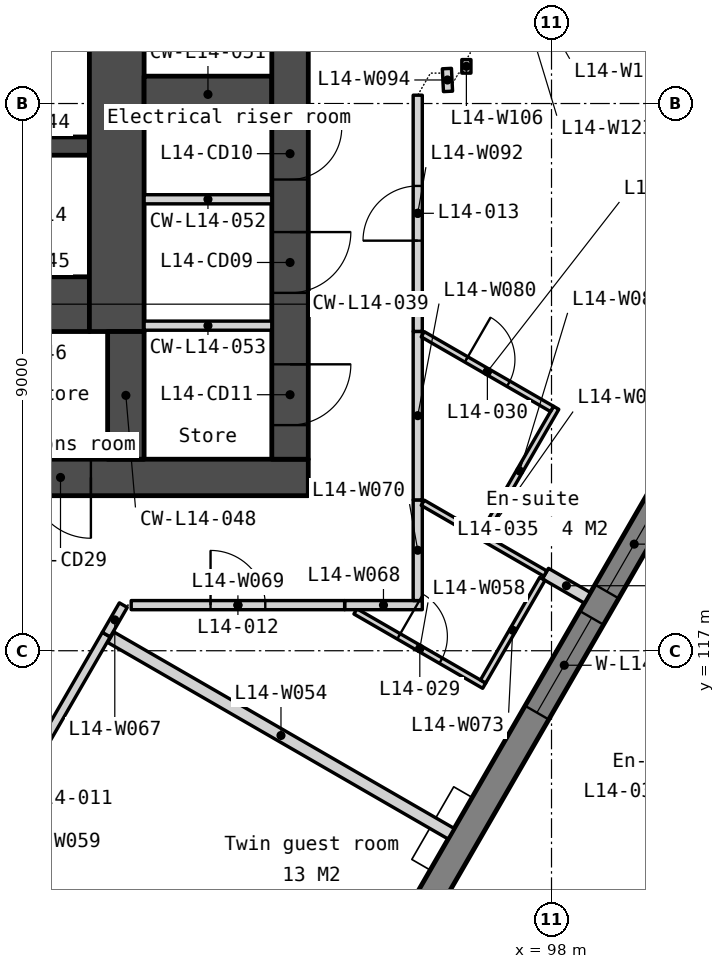
"""IFC4 building model, lengths in metres.
Left out: names, types, materials, properties, quantities, classifications, styles, units other than length and angle.
Written with IfcOpenShell. Run it as: python <this file> out.ifc"""

import sys

from ifc_helpers import new_model, si_unit, direction, frame, frame_2d, origin, place, context, subcontext, project, spatial, polyline, rectangle, outline, extrude, element, fill, save


model = new_model("IFC4")
c1 = context("Model", 3, precision=1e-05, world=origin(), true_north=direction((0.0, 1.0)))
c2 = subcontext(c1, "Body", "Model", "MODEL_VIEW")
j1 = project(units=[si_unit("LENGTHUNIT", "METRE"), si_unit("PLANEANGLEUNIT", "RADIAN")], contexts=[c1])
p1 = place(None, origin())
s1 = spatial("IfcSite", under=j1, at=p1, CompositionType="ELEMENT")
p2 = place(p1, origin())
s2 = spatial("IfcBuilding", under=s1, at=p2, CompositionType="ELEMENT")
p3 = place(p2, frame((0.0, 0.0, 63.0)))
s3 = spatial("IfcBuildingStorey", under=s2, at=p3, CompositionType="ELEMENT", Elevation=63.0)
p4 = place(p3, frame((66.0, 119.85, 0.0), z_axis=(0.0, 0.0, 1.0), x_axis=(1.0, 0.0, 0.0)))
e1 = element("IfcWall", 1, at=p4, inside=s3, PredefinedType="SOLIDWALL", context=c2, shape_type="SweptSolid", body=[
    extrude(rectangle(XDim=28.0, YDim=0.6, at=frame_2d((14.0, 0.0))), origin(), (0.0, 0.0, 1.0), 3.35),
])
p5 = place(p4, frame((6.825, 0.0, 0.0)))
e2 = element("IfcOpeningElement", 2, at=p5, cuts=e1, PredefinedType="OPENING", context=c2, shape_type="SweptSolid", body=[
    extrude(rectangle(XDim=1.8, YDim=2.1, at=frame_2d((0.9, 1.05))), frame((0.0, 0.31, 0.0), z_axis=(0.0, -1.0, 0.0), x_axis=(1.0, 0.0, 0.0)), (0.0, 0.0, 1.0), 0.62),
])
p6 = place(p4, frame((15.85, 0.0, 0.0)))
e3 = element("IfcOpeningElement", 3, at=p6, cuts=e1, PredefinedType="OPENING", context=c2, shape_type="SweptSolid", body=[
    extrude(rectangle(XDim=1.5, YDim=2.1, at=frame_2d((0.75, 1.05))), frame((0.0, 0.31, 0.0), z_axis=(0.0, -1.0, 0.0), x_axis=(1.0, 0.0, 0.0)), (0.0, 0.0, 1.0), 0.62),
])
p7 = place(p4, frame((19.375, 0.0, 0.0)))
e4 = element("IfcOpeningElement", 4, at=p7, cuts=e1, PredefinedType="OPENING", context=c2, shape_type="SweptSolid", body=[
    extrude(rectangle(XDim=1.8, YDim=2.1, at=frame_2d((0.9, 1.05))), frame((0.0, 0.31, 0.0), z_axis=(0.0, -1.0, 0.0), x_axis=(1.0, 0.0, 0.0)), (0.0, 0.0, 1.0), 0.62),
])
p8 = place(p4, frame((4.425, 0.0, 0.0)))
e5 = element("IfcOpeningElement", 5, at=p8, cuts=e1, PredefinedType="OPENING", context=c2, shape_type="SweptSolid", body=[
    extrude(rectangle(XDim=1.0, YDim=2.1, at=frame_2d((0.5, 1.05))), frame((0.0, 0.31, 0.0), z_axis=(0.0, -1.0, 0.0), x_axis=(1.0, 0.0, 0.0)), (0.0, 0.0, 1.0), 0.62),
])
p9 = place(p4, frame((9.925, 0.0, 0.0)))
e6 = element("IfcOpeningElement", 6, at=p9, cuts=e1, PredefinedType="OPENING", context=c2, shape_type="SweptSolid", body=[
    extrude(rectangle(XDim=1.0, YDim=2.1, at=frame_2d((0.5, 1.05))), frame((0.0, 0.31, 0.0), z_axis=(0.0, -1.0, 0.0), x_axis=(1.0, 0.0, 0.0)), (0.0, 0.0, 1.0), 0.62),
])
p10 = place(p4, frame((13.125, 0.0, 0.0)))
e7 = element("IfcOpeningElement", 7, at=p10, cuts=e1, PredefinedType="OPENING", context=c2, shape_type="SweptSolid", body=[
    extrude(rectangle(XDim=1.0, YDim=2.1, at=frame_2d((0.5, 1.05))), frame((0.0, 0.31, 0.0), z_axis=(0.0, -1.0, 0.0), x_axis=(1.0, 0.0, 0.0)), (0.0, 0.0, 1.0), 0.62),
])
p11 = place(p4, frame((21.725, 0.0, 0.0)))
e8 = element("IfcOpeningElement", 8, at=p11, cuts=e1, PredefinedType="OPENING", context=c2, shape_type="SweptSolid", body=[
    extrude(rectangle(XDim=1.0, YDim=2.1, at=frame_2d((0.5, 1.05))), frame((0.0, 0.31, 0.0), z_axis=(0.0, -1.0, 0.0), x_axis=(1.0, 0.0, 0.0)), (0.0, 0.0, 1.0), 0.62),
])
p12 = place(p4, frame((23.425, 0.0, 0.0)))
e9 = element("IfcOpeningElement", 9, at=p12, cuts=e1, PredefinedType="OPENING", context=c2, shape_type="SweptSolid", body=[
    extrude(rectangle(XDim=1.0, YDim=2.1, at=frame_2d((0.5, 1.05))), frame((0.0, 0.31, 0.0), z_axis=(0.0, -1.0, 0.0), x_axis=(1.0, 0.0, 0.0)), (0.0, 0.0, 1.0), 0.62),
])
p13 = place(p3, frame((87.85, 125.3, 0.0), z_axis=(0.0, 0.0, 1.0), x_axis=(1.0, 0.0, 0.0)))
e10 = element("IfcWall", 10, at=p13, inside=s3, PredefinedType="SOLIDWALL", context=c2, shape_type="SweptSolid", body=[
    extrude(rectangle(XDim=2.55, YDim=0.3, at=frame_2d((1.275, 0.0))), origin(), (0.0, 0.0, 1.0), 3.35),
])
p14 = place(p3, frame((87.85, 122.7, 0.0), z_axis=(0.0, 0.0, 1.0), x_axis=(1.0, 0.0, 0.0)))
e11 = element("IfcWall", 11, at=p14, inside=s3, PredefinedType="SOLIDWALL", context=c2, shape_type="SweptSolid", body=[
    extrude(rectangle(XDim=2.55, YDim=0.9, at=frame_2d((1.275, 0.0))), origin(), (0.0, 0.0, 1.0), 3.35),
])
p15 = place(p3, frame((90.85, 133.95, 0.0), z_axis=(0.0, 0.0, 1.0), x_axis=(0.0, -1.0, 0.0)))
e12 = element("IfcWall", 12, at=p15, inside=s3, PredefinedType="SOLIDWALL", context=c2, shape_type="SweptSolid", body=[
    extrude(rectangle(XDim=11.7, YDim=0.9, at=frame_2d((5.85, 0.0))), origin(), (0.0, 0.0, 1.0), 3.35),
])
p16 = place(p3, frame((91.0, 122.25, 0.0), z_axis=(0.0, 0.0, 1.0), x_axis=(0.0, -1.0, 0.0)))
e13 = element("IfcWall", 13, at=p16, inside=s3, PredefinedType="SOLIDWALL", context=c2, shape_type="SweptSolid", body=[
    extrude(rectangle(XDim=2.1, YDim=0.6, at=frame_2d((1.05, 0.0))), origin(), (0.0, 0.0, 1.0), 3.35),
])
p17 = place(p3, frame((91.3, 126.15, 0.0), z_axis=(0.0, 0.0, 1.0), x_axis=(1.0, 0.0, 0.0)))
e14 = element("IfcWall", 14, at=p17, inside=s3, PredefinedType="SOLIDWALL", context=c2, shape_type="SweptSolid", body=[
    extrude(rectangle(XDim=2.1, YDim=0.6, at=frame_2d((1.05, 0.0))), origin(), (0.0, 0.0, 1.0), 3.35),
])
for number, where, z_axis, x_axis in (
    (15, (91.3, 124.425, 0.0), (0.0, 0.0, 1.0), (1.0, 0.0, 0.0)),
    (16, (91.3, 122.346, 0.0), (0.0, 0.0, 1.0), (1.0, 0.0, 0.0)),
):
    element("IfcWall", number, at=place(p3, frame(where, z_axis=z_axis, x_axis=x_axis)), inside=s3, PredefinedType="PARTITIONING", context=c2, shape_type="SweptSolid", body=[
        extrude(rectangle(XDim=2.1, YDim=0.15, at=frame_2d((1.05, 0.0))), origin(), (0.0, 0.0, 1.0), 3.35),
    ])
p18 = place(p3, frame((93.7, 133.95, 0.0), z_axis=(0.0, 0.0, 1.0), x_axis=(0.0, -1.0, 0.0)))
e17 = element("IfcWall", 17, at=p18, inside=s3, PredefinedType="SOLIDWALL", context=c2, shape_type="SweptSolid", body=[
    extrude(rectangle(XDim=13.8, YDim=0.6, at=frame_2d((6.9, 0.0))), origin(), (0.0, 0.0, 1.0), 3.35),
])
p19 = place(p18, frame((0.6, 0.0, 0.0)))
e18 = element("IfcOpeningElement", 18, at=p19, cuts=e17, PredefinedType="OPENING", context=c2, shape_type="SweptSolid", body=[
    extrude(rectangle(XDim=1.1, YDim=2.1, at=frame_2d((0.55, 1.05))), frame((0.0, 0.31, 0.0), z_axis=(0.0, -1.0, 0.0), x_axis=(1.0, 0.0, 0.0)), (0.0, 0.0, 1.0), 0.62),
])
p20 = place(p18, frame((10.064, 0.0, 0.0)))
e19 = element("IfcOpeningElement", 19, at=p20, cuts=e17, PredefinedType="OPENING", context=c2, shape_type="SweptSolid", body=[
    extrude(rectangle(XDim=1.0, YDim=2.1, at=frame_2d((0.5, 1.05))), frame((0.0, 0.31, 0.0), z_axis=(0.0, -1.0, 0.0), x_axis=(1.0, 0.0, 0.0)), (0.0, 0.0, 1.0), 0.62),
])
p21 = place(p18, frame((8.35, 0.0, 0.0)))
e20 = element("IfcOpeningElement", 20, at=p21, cuts=e17, PredefinedType="OPENING", context=c2, shape_type="SweptSolid", body=[
    extrude(rectangle(XDim=0.85, YDim=2.1, at=frame_2d((0.425, 1.05))), frame((0.0, 0.31, 0.0), z_axis=(0.0, -1.0, 0.0), x_axis=(1.0, 0.0, 0.0)), (0.0, 0.0, 1.0), 0.62),
])
p22 = place(p18, frame((12.239, 0.0, 0.0)))
e21 = element("IfcOpeningElement", 21, at=p22, cuts=e17, PredefinedType="OPENING", context=c2, shape_type="SweptSolid", body=[
    extrude(rectangle(XDim=1.0, YDim=2.1, at=frame_2d((0.5, 1.05))), frame((0.0, 0.31, 0.0), z_axis=(0.0, -1.0, 0.0), x_axis=(1.0, 0.0, 0.0)), (0.0, 0.0, 1.0), 0.62),
])
p23 = place(p3, frame((83.105, 90.599, -0.15), z_axis=(0.0, 0.0, 1.0), x_axis=(0.499999201451, 0.866025864826, 0.0)))
e22 = element("IfcWall", 22, at=p23, inside=s3, PredefinedType="SOLIDWALL", context=c2, shape_type="SweptSolid", body=[
    extrude(outline(polyline([(44.8, 0.0), (44.8, 3.5), (0.0, 3.5), (0.0, 0.0), (44.8, 0.0)])), frame((0.0, 0.225, 0.0), z_axis=(0.0, -1.0, 0.0), x_axis=(1.0, 0.0, 0.0)), (0.0, 0.0, 1.0), 0.45),
])
p24 = place(p23, frame((2.43, 0.0, 1.05)))
e23 = element("IfcOpeningElement", 23, at=p24, cuts=e22, PredefinedType="OPENING", context=c2, shape_type="SweptSolid", body=[
    extrude(rectangle(XDim=1.8, YDim=1.5, at=frame_2d((0.9, 0.75))), frame((0.0, 0.235, 0.0), z_axis=(0.0, -1.0, 0.0), x_axis=(1.0, 0.0, 0.0)), (0.0, 0.0, 1.0), 0.47),
])
p25 = place(p23, frame((4.73, 0.0, 1.05)))
e24 = element("IfcOpeningElement", 24, at=p25, cuts=e22, PredefinedType="OPENING", context=c2, shape_type="SweptSolid", body=[
    extrude(rectangle(XDim=1.8, YDim=1.5, at=frame_2d((0.9, 0.75))), frame((0.0, 0.235, 0.0), z_axis=(0.0, -1.0, 0.0), x_axis=(1.0, 0.0, 0.0)), (0.0, 0.0, 1.0), 0.47),
])
p26 = place(p23, frame((11.39, 0.0, 1.05)))
e25 = element("IfcOpeningElement", 25, at=p26, cuts=e22, PredefinedType="OPENING", context=c2, shape_type="SweptSolid", body=[
    extrude(rectangle(XDim=1.8, YDim=1.5, at=frame_2d((0.9, 0.75))), frame((0.0, 0.235, 0.0), z_axis=(0.0, -1.0, 0.0), x_axis=(1.0, 0.0, 0.0)), (0.0, 0.0, 1.0), 0.47),
])
p27 = place(p23, frame((13.69, 0.0, 1.05)))
e26 = element("IfcOpeningElement", 26, at=p27, cuts=e22, PredefinedType="OPENING", context=c2, shape_type="SweptSolid", body=[
    extrude(rectangle(XDim=1.8, YDim=1.5, at=frame_2d((0.9, 0.75))), frame((0.0, 0.235, 0.0), z_axis=(0.0, -1.0, 0.0), x_axis=(1.0, 0.0, 0.0)), (0.0, 0.0, 1.0), 0.47),
])
p28 = place(p23, frame((20.35, 0.0, 1.05)))
e27 = element("IfcOpeningElement", 27, at=p28, cuts=e22, PredefinedType="OPENING", context=c2, shape_type="SweptSolid", body=[
    extrude(rectangle(XDim=1.8, YDim=1.5, at=frame_2d((0.9, 0.75))), frame((0.0, 0.235, 0.0), z_axis=(0.0, -1.0, 0.0), x_axis=(1.0, 0.0, 0.0)), (0.0, 0.0, 1.0), 0.47),
])
p29 = place(p23, frame((22.65, 0.0, 1.05)))
e28 = element("IfcOpeningElement", 28, at=p29, cuts=e22, PredefinedType="OPENING", context=c2, shape_type="SweptSolid", body=[
    extrude(rectangle(XDim=1.8, YDim=1.5, at=frame_2d((0.9, 0.75))), frame((0.0, 0.235, 0.0), z_axis=(0.0, -1.0, 0.0), x_axis=(1.0, 0.0, 0.0)), (0.0, 0.0, 1.0), 0.47),
])
p30 = place(p23, frame((29.31, 0.0, 1.05)))
e29 = element("IfcOpeningElement", 29, at=p30, cuts=e22, PredefinedType="OPENING", context=c2, shape_type="SweptSolid", body=[
    extrude(rectangle(XDim=1.8, YDim=1.5, at=frame_2d((0.9, 0.75))), frame((0.0, 0.235, 0.0), z_axis=(0.0, -1.0, 0.0), x_axis=(1.0, 0.0, 0.0)), (0.0, 0.0, 1.0), 0.47),
])
p31 = place(p23, frame((31.61, 0.0, 1.05)))
e30 = element("IfcOpeningElement", 30, at=p31, cuts=e22, PredefinedType="OPENING", context=c2, shape_type="SweptSolid", body=[
    extrude(rectangle(XDim=1.8, YDim=1.5, at=frame_2d((0.9, 0.75))), frame((0.0, 0.235, 0.0), z_axis=(0.0, -1.0, 0.0), x_axis=(1.0, 0.0, 0.0)), (0.0, 0.0, 1.0), 0.47),
])
p32 = place(p23, frame((38.27, 0.0, 1.05)))
e31 = element("IfcOpeningElement", 31, at=p32, cuts=e22, PredefinedType="OPENING", context=c2, shape_type="SweptSolid", body=[
    extrude(rectangle(XDim=1.8, YDim=1.5, at=frame_2d((0.9, 0.75))), frame((0.0, 0.235, 0.0), z_axis=(0.0, -1.0, 0.0), x_axis=(1.0, 0.0, 0.0)), (0.0, 0.0, 1.0), 0.47),
])
p33 = place(p23, frame((40.57, 0.0, 1.05)))
e32 = element("IfcOpeningElement", 32, at=p33, cuts=e22, PredefinedType="OPENING", context=c2, shape_type="SweptSolid", body=[
    extrude(rectangle(XDim=1.8, YDim=1.5, at=frame_2d((0.9, 0.75))), frame((0.0, 0.235, 0.0), z_axis=(0.0, -1.0, 0.0), x_axis=(1.0, 0.0, 0.0)), (0.0, 0.0, 1.0), 0.47),
])
p34 = place(p3, frame((90.751, 117.223, 0.0), z_axis=(0.0, 0.0, 1.0), x_axis=(0.866015162859, -0.500017737384, 0.0)))
e33 = element("IfcWall", 33, at=p34, inside=s3, PredefinedType="PARTITIONING", context=c2, shape_type="SweptSolid", body=[
    extrude(rectangle(XDim=6.465, YDim=0.2, at=frame_2d((3.232, 0.0))), origin(), (0.0, 0.0, 1.0), 3.35),
])
p35 = place(p3, frame((94.775, 117.647, 0.0), z_axis=(0.0, 0.0, 1.0), x_axis=(0.86604092097, -0.499973122483, 0.0)))
e34 = element("IfcWall", 34, at=p35, inside=s3, PredefinedType="PARTITIONING", context=c2, shape_type="SweptSolid", body=[
    extrude(rectangle(XDim=2.445, YDim=0.1, at=frame_2d((1.223, 0.0))), origin(), (0.0, 0.0, 1.0), 3.35),
])
p36 = place(p35, frame((0.823, 0.0, 0.0)))
e35 = element("IfcOpeningElement", 35, at=p36, cuts=e34, PredefinedType="OPENING", context=c2, shape_type="SweptSolid", body=[
    extrude(rectangle(XDim=0.8, YDim=2.1, at=frame_2d((0.4, 1.05))), frame((0.0, 0.06, 0.0), z_axis=(0.0, -1.0, 0.0), x_axis=(1.0, 0.0, 0.0)), (0.0, 0.0, 1.0), 0.12),
])
p37 = place(p3, frame((87.548, 111.844, 0.0), z_axis=(0.0, 0.0, 1.0), x_axis=(0.499981277565, 0.866036212918, 0.0)))
e36 = element("IfcWall", 36, at=p37, inside=s3, PredefinedType="PARTITIONING", context=c2, shape_type="SweptSolid", body=[
    extrude(rectangle(XDim=6.26, YDim=0.15, at=frame_2d((3.13, 0.0))), origin(), (0.0, 0.0, 1.0), 3.35),
])
p38 = place(p37, frame((2.63, 0.0, 0.0)))
e37 = element("IfcOpeningElement", 37, at=p38, cuts=e36, PredefinedType="OPENING", context=c2, shape_type="SweptSolid", body=[
    extrude(rectangle(XDim=1.0, YDim=2.1, at=frame_2d((0.5, 1.05))), frame((0.0, 0.085, 0.0), z_axis=(0.0, -1.0, 0.0), x_axis=(1.0, 0.0, 0.0)), (0.0, 0.0, 1.0), 0.17),
])
p39 = place(p3, frame((90.678, 117.265, 0.0), z_axis=(0.0, 0.0, 1.0), x_axis=(0.50012503653, 0.865953201874, 0.0)))
e38 = element("IfcWall", 38, at=p39, inside=s3, PredefinedType="PARTITIONING", context=c2, shape_type="SweptSolid", body=[
    extrude(rectangle(XDim=0.56, YDim=0.15, at=frame_2d((0.28, 0.0))), origin(), (0.0, 0.0, 1.0), 3.35),
])
p40 = place(p3, frame((94.598, 117.75, 0.0), z_axis=(0.0, 0.0, 1.0), x_axis=(1.0, 0.0, 0.0)))
e39 = element("IfcWall", 39, at=p40, inside=s3, PredefinedType="PARTITIONING", context=c2, shape_type="SweptSolid", body=[
    extrude(rectangle(XDim=1.277, YDim=0.15, at=frame_2d((0.639, 0.0))), origin(), (0.0, 0.0, 1.0), 3.35),
])
p41 = place(p3, frame((91.088, 117.75, 0.0), z_axis=(0.0, 0.0, 1.0), x_axis=(1.0, 0.0, 0.0)))
e40 = element("IfcWall", 40, at=p41, inside=s3, PredefinedType="PARTITIONING", context=c2, shape_type="SweptSolid", body=[
    extrude(rectangle(XDim=3.51, YDim=0.15, at=frame_2d((1.755, 0.0))), origin(), (0.0, 0.0, 1.0), 3.35),
])
p42 = place(p41, frame((1.305, 0.0, 0.0)))
e41 = element("IfcOpeningElement", 41, at=p42, cuts=e40, PredefinedType="OPENING", context=c2, shape_type="SweptSolid", body=[
    extrude(rectangle(XDim=0.9, YDim=2.1, at=frame_2d((0.45, 1.05))), frame((0.0, 0.085, 0.0), z_axis=(0.0, -1.0, 0.0), x_axis=(1.0, 0.0, 0.0)), (0.0, 0.0, 1.0), 0.17),
])
p43 = place(p3, frame((95.8, 117.825, 0.0), z_axis=(0.0, 0.0, 1.0), x_axis=(0.0, 1.0, 0.0)))
e42 = element("IfcWall", 42, at=p43, inside=s3, PredefinedType="PARTITIONING", context=c2, shape_type="SweptSolid", body=[
    extrude(rectangle(XDim=1.656, YDim=0.15, at=frame_2d((0.828, 0.0))), origin(), (0.0, 0.0, 1.0), 3.35),
])
p44 = place(p3, frame((97.9, 118.269, 0.0), z_axis=(0.0, 0.0, 1.0), x_axis=(0.866068339032, -0.499925626596, 0.0)))
e43 = element("IfcWall", 43, at=p44, inside=s3, PredefinedType="PARTITIONING", context=c2, shape_type="SweptSolid", body=[
    extrude(rectangle(XDim=0.797, YDim=0.2, at=frame_2d((0.399, 0.0))), origin(), (0.0, 0.0, 1.0), 3.35),
])
p45 = place(p3, frame((96.875, 116.493, 0.0), z_axis=(0.0, 0.0, 1.0), x_axis=(0.500043961785, 0.866000020948, 0.0)))
e44 = element("IfcWall", 44, at=p45, inside=s3, PredefinedType="PARTITIONING", context=c2, shape_type="SweptSolid", body=[
    extrude(rectangle(XDim=1.95, YDim=0.1, at=frame_2d((0.975, 0.0))), origin(), (0.0, 0.0, 1.0), 3.35),
])
p46 = place(p3, frame((95.882, 119.433, 0.0), z_axis=(0.0, 0.0, 1.0), x_axis=(0.866009305107, -0.50002788269, 0.0)))
e45 = element("IfcWall", 45, at=p46, inside=s3, PredefinedType="PARTITIONING", context=c2, shape_type="SweptSolid", body=[
    extrude(rectangle(XDim=2.329, YDim=0.1, at=frame_2d((1.165, 0.0))), origin(), (0.0, 0.0, 1.0), 3.35),
])
p47 = place(p3, frame((95.8, 119.481, 0.0), z_axis=(0.0, 0.0, 1.0), x_axis=(0.0, 1.0, 0.0)))
e46 = element("IfcWall", 46, at=p47, inside=s3, PredefinedType="PARTITIONING", context=c2, shape_type="SweptSolid", body=[
    extrude(rectangle(XDim=2.771, YDim=0.15, at=frame_2d((1.386, 0.0))), origin(), (0.0, 0.0, 1.0), 3.35),
])
p48 = place(p3, frame((96.877, 118.917, 0.0), z_axis=(0.0, 0.0, 1.0), x_axis=(0.500001309137, 0.866024647952, 0.0)))
e47 = element("IfcWall", 47, at=p48, inside=s3, PredefinedType="PARTITIONING", context=c2, shape_type="SweptSolid", body=[
    extrude(rectangle(XDim=2.4, YDim=0.1, at=frame_2d((1.2, 0.0))), origin(), (0.0, 0.0, 1.0), 3.35),
])
p49 = place(p3, frame((95.882, 122.205, 0.0), z_axis=(0.0, 0.0, 1.0), x_axis=(0.866006720078, -0.500032359733, 0.0)))
e48 = element("IfcWall", 48, at=p49, inside=s3, PredefinedType="PARTITIONING", context=c2, shape_type="SweptSolid", body=[
    extrude(rectangle(XDim=2.455, YDim=0.1, at=frame_2d((1.228, 0.0))), origin(), (0.0, 0.0, 1.0), 3.35),
])
p50 = place(p49, frame((0.827, 0.0, 0.0)))
e49 = element("IfcOpeningElement", 49, at=p50, cuts=e48, PredefinedType="OPENING", context=c2, shape_type="SweptSolid", body=[
    extrude(rectangle(XDim=0.8, YDim=2.1, at=frame_2d((0.4, 1.05))), frame((0.0, 0.06, 0.0), z_axis=(0.0, -1.0, 0.0), x_axis=(1.0, 0.0, 0.0)), (0.0, 0.0, 1.0), 0.12),
])
p51 = place(p3, frame((95.8, 122.252, 0.0), z_axis=(0.0, 0.0, 1.0), x_axis=(0.0, 1.0, 0.0)))
e50 = element("IfcWall", 50, at=p51, inside=s3, PredefinedType="PARTITIONING", context=c2, shape_type="SweptSolid", body=[
    extrude(rectangle(XDim=3.885, YDim=0.15, at=frame_2d((1.942, 0.0))), origin(), (0.0, 0.0, 1.0), 3.35),
])
p52 = place(p51, frame((1.492, 0.0, 0.0)))
e51 = element("IfcOpeningElement", 51, at=p52, cuts=e50, PredefinedType="OPENING", context=c2, shape_type="SweptSolid", body=[
    extrude(rectangle(XDim=0.9, YDim=2.1, at=frame_2d((0.45, 1.05))), frame((0.0, 0.085, 0.0), z_axis=(0.0, -1.0, 0.0), x_axis=(1.0, 0.0, 0.0)), (0.0, 0.0, 1.0), 0.17),
])
p53 = place(p3, frame((96.28, 126.575, 0.0), z_axis=(0.0, 0.0, 1.0), x_axis=(0.049354603538, -0.998781318963, 0.0)))
e52 = element("IfcWall", 52, at=p53, inside=s3, PredefinedType="PARTITIONING", context=c2, shape_type="SweptSolid", body=[
    extrude(rectangle(XDim=0.376, YDim=0.15, at=frame_2d((0.188, 0.0))), origin(), (0.0, 0.0, 1.0), 3.35),
])
p54 = place(p3, frame((96.6, 126.5, 0.0), z_axis=(0.0, 0.0, 1.0), x_axis=(0.0, 1.0, 0.0)))
e53 = element("IfcWall", 53, at=p54, inside=s3, PredefinedType="PARTITIONING", context=c2, shape_type="SweptSolid", body=[
    extrude(rectangle(XDim=0.223, YDim=0.15, at=frame_2d((0.111, 0.0))), origin(), (0.0, 0.0, 1.0), 3.35),
])
p55 = place(p3, frame((98.512, 128.261, 0.0), z_axis=(0.0, 0.0, 1.0), x_axis=(0.866031112038, -0.499990112884, 0.0)))
e54 = element("IfcWall", 54, at=p55, inside=s3, PredefinedType="PARTITIONING", context=c2, shape_type="SweptSolid", body=[
    extrude(rectangle(XDim=5.264, YDim=0.2, at=frame_2d((2.632, 0.0))), origin(), (0.0, 0.0, 1.0), 3.35),
])
p56 = place(p20, origin())
e55 = element("IfcDoor", 55, at=p56, inside=s3, OperationType="SINGLE_SWING_LEFT", PredefinedType="DOOR", context=c2, shape_type="SweptSolid", body=[
    extrude(rectangle(XDim=1.0, YDim=2.1, at=frame_2d((0.5, 1.05))), frame((0.0, 0.025, 0.0), z_axis=(0.0, -1.0, 0.0), x_axis=(1.0, 0.0, 0.0)), (0.0, 0.0, 1.0), 0.05),
])
fill(e19, e55)
p57 = place(p21, origin())
e56 = element("IfcDoor", 56, at=p57, inside=s3, OperationType="SINGLE_SWING_LEFT", PredefinedType="DOOR", context=c2, shape_type="SweptSolid", body=[
    extrude(rectangle(XDim=0.85, YDim=2.1, at=frame_2d((0.425, 1.05))), frame((0.0, 0.025, 0.0), z_axis=(0.0, -1.0, 0.0), x_axis=(1.0, 0.0, 0.0)), (0.0, 0.0, 1.0), 0.05),
])
fill(e20, e56)
p58 = place(p22, origin())
e57 = element("IfcDoor", 57, at=p58, inside=s3, OperationType="SINGLE_SWING_LEFT", PredefinedType="DOOR", context=c2, shape_type="SweptSolid", body=[
    extrude(rectangle(XDim=1.0, YDim=2.1, at=frame_2d((0.5, 1.05))), frame((0.0, 0.025, 0.0), z_axis=(0.0, -1.0, 0.0), x_axis=(1.0, 0.0, 0.0)), (0.0, 0.0, 1.0), 0.05),
])
fill(e21, e57)
p59 = place(p12, origin())
e58 = element("IfcDoor", 58, at=p59, inside=s3, OperationType="SINGLE_SWING_RIGHT", PredefinedType="DOOR", context=c2, shape_type="SweptSolid", body=[
    extrude(rectangle(XDim=1.0, YDim=2.1, at=frame_2d((0.5, 1.05))), frame((0.0, 0.025, 0.0), z_axis=(0.0, -1.0, 0.0), x_axis=(1.0, 0.0, 0.0)), (0.0, 0.0, 1.0), 0.05),
])
fill(e9, e58)
p60 = place(p30, origin())
e59 = element("IfcWindow", 59, at=p60, inside=s3, PartitioningType="SINGLE_PANEL", PredefinedType="WINDOW", context=c2, shape_type="SweptSolid", body=[
    extrude(rectangle(XDim=1.8, YDim=1.5, at=frame_2d((0.9, 0.75))), frame((0.0, 0.03, 0.0), z_axis=(0.0, -1.0, 0.0), x_axis=(1.0, 0.0, 0.0)), (0.0, 0.0, 1.0), 0.06),
])
fill(e29, e59)
p61 = place(p31, origin())
e60 = element("IfcWindow", 60, at=p61, inside=s3, PartitioningType="SINGLE_PANEL", PredefinedType="WINDOW", context=c2, shape_type="SweptSolid", body=[
    extrude(rectangle(XDim=1.8, YDim=1.5, at=frame_2d((0.9, 0.75))), frame((0.0, 0.03, 0.0), z_axis=(0.0, -1.0, 0.0), x_axis=(1.0, 0.0, 0.0)), (0.0, 0.0, 1.0), 0.06),
])
fill(e30, e60)
p62 = place(p42, origin())
e61 = element("IfcDoor", 61, at=p62, inside=s3, OperationType="SINGLE_SWING_LEFT", PredefinedType="DOOR", context=c2, shape_type="SweptSolid", body=[
    extrude(rectangle(XDim=0.9, YDim=2.1, at=frame_2d((0.45, 1.05))), frame((0.0, 0.025, 0.0), z_axis=(0.0, -1.0, 0.0), x_axis=(1.0, 0.0, 0.0)), (0.0, 0.0, 1.0), 0.05),
])
fill(e41, e61)
p63 = place(p52, origin())
e62 = element("IfcDoor", 62, at=p63, inside=s3, OperationType="SINGLE_SWING_LEFT", PredefinedType="DOOR", context=c2, shape_type="SweptSolid", body=[
    extrude(rectangle(XDim=0.9, YDim=2.1, at=frame_2d((0.45, 1.05))), frame((0.0, 0.025, 0.0), z_axis=(0.0, -1.0, 0.0), x_axis=(1.0, 0.0, 0.0)), (0.0, 0.0, 1.0), 0.05),
])
fill(e51, e62)
p64 = place(p36, origin())
e63 = element("IfcDoor", 63, at=p64, inside=s3, OperationType="SINGLE_SWING_LEFT", PredefinedType="DOOR", context=c2, shape_type="SweptSolid", body=[
    extrude(rectangle(XDim=0.8, YDim=2.1, at=frame_2d((0.4, 1.05))), frame((0.0, 0.025, 0.0), z_axis=(0.0, -1.0, 0.0), x_axis=(1.0, 0.0, 0.0)), (0.0, 0.0, 1.0), 0.05),
])
fill(e35, e63)
p65 = place(p50, origin())
e64 = element("IfcDoor", 64, at=p65, inside=s3, OperationType="SINGLE_SWING_LEFT", PredefinedType="DOOR", context=c2, shape_type="SweptSolid", body=[
    extrude(rectangle(XDim=0.8, YDim=2.1, at=frame_2d((0.4, 1.05))), frame((0.0, 0.025, 0.0), z_axis=(0.0, -1.0, 0.0), x_axis=(1.0, 0.0, 0.0)), (0.0, 0.0, 1.0), 0.05),
])
fill(e49, e64)
save(model, sys.argv[1])
